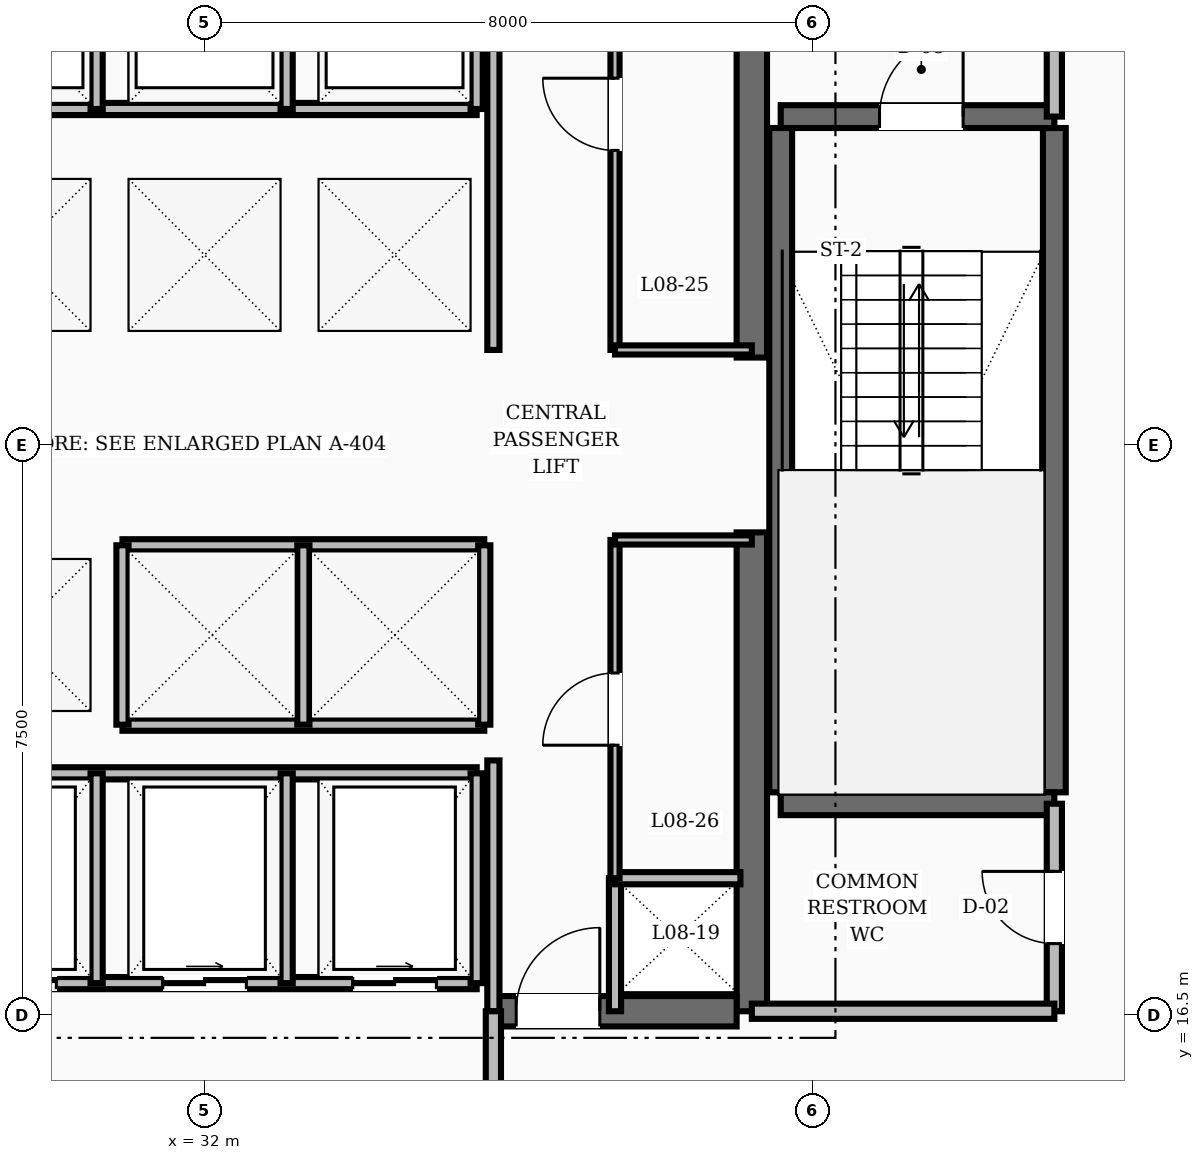
"""IFC4 building model, lengths in metres.
Left out: names, types, materials, properties, quantities, classifications, styles, units other than length and angle.
Written with IfcOpenShell. Run it as: python <this file> out.ifc"""

import sys

from ifc_helpers import new_model, si_unit, direction, frame, frame_2d, origin, place, context, subcontext, project, spatial, rectangle, extrude, element, fill, save


model = new_model("IFC4")
c1 = context("Model", 3, precision=1e-05, world=origin(), true_north=direction((0.0, 1.0)))
c2 = subcontext(c1, "Body", "Model", "MODEL_VIEW")
j1 = project(units=[si_unit("LENGTHUNIT", "METRE"), si_unit("PLANEANGLEUNIT", "RADIAN")], contexts=[c1])
p1 = place(None, origin())
s1 = spatial("IfcSite", under=j1, at=p1, CompositionType="ELEMENT")
p2 = place(p1, origin())
s2 = spatial("IfcBuilding", under=s1, at=p2, CompositionType="ELEMENT")
p3 = place(p2, frame((0.0, 0.0, 37.6)))
s3 = spatial("IfcBuildingStorey", under=s2, at=p3, CompositionType="ELEMENT", Elevation=37.6)
for number, where, z_axis, x_axis in (
    (1, (39.2, 16.55, 0.0), (0.0, 0.0, 1.0), (0.0, 1.0, 0.0)),
    (2, (39.2, 25.15, 0.0), (0.0, 0.0, 1.0), (0.0, 1.0, 0.0)),
):
    element("IfcWall", number, at=place(p3, frame(where, z_axis=z_axis, x_axis=x_axis)), inside=s3, PredefinedType="SHEAR", context=c2, shape_type="SweptSolid", body=[
        extrude(rectangle(XDim=6.3, YDim=0.4, at=frame_2d((3.15, 0.0))), origin(), (0.0, 0.0, 1.0), 3.6),
    ])
p4 = place(p3, frame((35.8, 16.55, 0.0), z_axis=(0.0, 0.0, 1.0), x_axis=(1.0, 0.0, 0.0)))
e3 = element("IfcWall", 3, at=p4, inside=s3, PredefinedType="SHEAR", context=c2, shape_type="SweptSolid", body=[
    extrude(rectangle(XDim=3.2, YDim=0.4, at=frame_2d((1.6, 0.0))), origin(), (0.0, 0.0, 1.0), 3.6),
])
p5 = place(p4, frame((0.3, 0.0, 0.0)))
e4 = element("IfcOpeningElement", 4, at=p5, cuts=e3, PredefinedType="OPENING", context=c2, shape_type="SweptSolid", body=[
    extrude(rectangle(XDim=1.1, YDim=2.1, at=frame_2d((0.55, 1.05))), frame((0.0, 0.21, 0.0), z_axis=(0.0, -1.0, 0.0), x_axis=(1.0, 0.0, 0.0)), (0.0, 0.0, 1.0), 0.42),
])
for number, where, z_axis, x_axis in (
    (5, (43.18, 19.43, 0.0), (0.0, 0.0, 1.0), (0.0, 1.0, 0.0)),
    (6, (39.58, 19.43, 0.0), (0.0, 0.0, 1.0), (0.0, 1.0, 0.0)),
):
    element("IfcWall", number, at=place(p3, frame(where, z_axis=z_axis, x_axis=x_axis)), inside=s3, PredefinedType="SHEAR", context=c2, shape_type="SweptSolid", body=[
        extrude(rectangle(XDim=8.74, YDim=0.3, at=frame_2d((4.37, 0.0))), origin(), (0.0, 0.0, 1.0), 3.6),
    ])
p6 = place(p3, frame((39.58, 19.28, 0.0), z_axis=(0.0, 0.0, 1.0), x_axis=(1.0, 0.0, 0.0)))
e7 = element("IfcWall", 7, at=p6, inside=s3, PredefinedType="SHEAR", context=c2, shape_type="SweptSolid", body=[
    extrude(rectangle(XDim=3.6, YDim=0.3, at=frame_2d((1.8, 0.0))), origin(), (0.0, 0.0, 1.0), 3.6),
])
p7 = place(p3, frame((39.58, 28.32, 0.0), z_axis=(0.0, 0.0, 1.0), x_axis=(1.0, 0.0, 0.0)))
e8 = element("IfcWall", 8, at=p7, inside=s3, PredefinedType="SHEAR", context=c2, shape_type="SweptSolid", body=[
    extrude(rectangle(XDim=3.6, YDim=0.3, at=frame_2d((1.8, 0.0))), origin(), (0.0, 0.0, 1.0), 3.6),
])
p8 = place(p7, frame((1.3, 0.0, 0.0)))
e9 = element("IfcOpeningElement", 9, at=p8, cuts=e8, PredefinedType="OPENING", context=c2, shape_type="SweptSolid", body=[
    extrude(rectangle(XDim=1.1, YDim=2.1, at=frame_2d((0.55, 1.05))), frame((0.0, 0.16, 0.0), z_axis=(0.0, -1.0, 0.0), x_axis=(1.0, 0.0, 0.0)), (0.0, 0.0, 1.0), 0.32),
])
p9 = place(p3, frame((43.18, 28.32, 0.0), z_axis=(0.0, 0.0, 1.0), x_axis=(0.0, 1.0, 0.0)))
e10 = element("IfcWall", 10, at=p9, inside=s3, PredefinedType="SOLIDWALL", context=c2, shape_type="SweptSolid", body=[
    extrude(rectangle(XDim=3.13, YDim=0.2, at=frame_2d((1.565, 0.0))), origin(), (0.0, 0.0, 1.0), 2.61),
])
p10 = place(p9, frame((1.015, 0.0, 0.0)))
e11 = element("IfcOpeningElement", 11, at=p10, cuts=e10, PredefinedType="OPENING", context=c2, shape_type="SweptSolid", body=[
    extrude(rectangle(XDim=1.1, YDim=2.1, at=frame_2d((0.55, 1.05))), frame((0.0, 0.11, 0.0), z_axis=(0.0, -1.0, 0.0), x_axis=(1.0, 0.0, 0.0)), (0.0, 0.0, 1.0), 0.22),
])
p11 = place(p3, frame((43.18, 16.55, 0.0), z_axis=(0.0, 0.0, 1.0), x_axis=(0.0, 1.0, 0.0)))
e12 = element("IfcWall", 12, at=p11, inside=s3, PredefinedType="SOLIDWALL", context=c2, shape_type="SweptSolid", body=[
    extrude(rectangle(XDim=2.73, YDim=0.2, at=frame_2d((1.365, 0.0))), origin(), (0.0, 0.0, 1.0), 2.61),
])
p12 = place(p11, frame((0.89, 0.0, 0.0)))
e13 = element("IfcOpeningElement", 13, at=p12, cuts=e12, PredefinedType="OPENING", context=c2, shape_type="SweptSolid", body=[
    extrude(rectangle(XDim=0.95, YDim=2.1, at=frame_2d((0.475, 1.05))), frame((0.0, 0.11, 0.0), z_axis=(0.0, -1.0, 0.0), x_axis=(1.0, 0.0, 0.0)), (0.0, 0.0, 1.0), 0.22),
])
p13 = place(p3, frame((39.2, 16.55, 0.0), z_axis=(0.0, 0.0, 1.0), x_axis=(1.0, 0.0, 0.0)))
e14 = element("IfcWall", 14, at=p13, inside=s3, PredefinedType="SOLIDWALL", context=c2, shape_type="SweptSolid", body=[
    extrude(rectangle(XDim=3.98, YDim=0.2, at=frame_2d((1.99, 0.0))), origin(), (0.0, 0.0, 1.0), 2.61),
])
p14 = place(p3, frame((35.8, 16.55, 0.0), z_axis=(0.0, 0.0, 1.0), x_axis=(0.0, 1.0, 0.0)))
e15 = element("IfcWall", 15, at=p14, inside=s3, PredefinedType="SOLIDWALL", context=c2, shape_type="SweptSolid", body=[
    extrude(rectangle(XDim=3.3, YDim=0.16, at=frame_2d((1.65, 0.0))), origin(), (0.0, 0.0, 1.0), 2.61),
])
p15 = place(p3, frame((37.4, 16.55, 0.0), z_axis=(0.0, 0.0, 1.0), x_axis=(0.0, 1.0, 0.0)))
e16 = element("IfcWall", 16, at=p15, inside=s3, PredefinedType="SOLIDWALL", context=c2, shape_type="SweptSolid", body=[
    extrude(rectangle(XDim=1.75, YDim=0.16, at=frame_2d((0.875, 0.0))), origin(), (0.0, 0.0, 1.0), 2.61),
])
p16 = place(p3, frame((35.8, 25.25, 0.0), z_axis=(0.0, 0.0, 1.0), x_axis=(0.0, 1.0, 0.0)))
e17 = element("IfcWall", 17, at=p16, inside=s3, PredefinedType="SOLIDWALL", context=c2, shape_type="SweptSolid", body=[
    extrude(rectangle(XDim=6.2, YDim=0.16, at=frame_2d((3.1, 0.0))), origin(), (0.0, 0.0, 1.0), 2.61),
])
p17 = place(p3, frame((35.8, 14.35, 0.0), z_axis=(0.0, 0.0, 1.0), x_axis=(0.0, 1.0, 0.0)))
e18 = element("IfcWall", 18, at=p17, inside=s3, PredefinedType="SOLIDWALL", context=c2, shape_type="SweptSolid", body=[
    extrude(rectangle(XDim=2.2, YDim=0.2, at=frame_2d((1.1, 0.0))), origin(), (0.0, 0.0, 1.0), 2.61),
])
p18 = place(p3, frame((28.42, 28.42, 0.0), z_axis=(0.0, 0.0, 1.0), x_axis=(1.0, 0.0, 0.0)))
e19 = element("IfcWall", 19, at=p18, inside=s3, PredefinedType="SOLIDWALL", context=c2, shape_type="SweptSolid", body=[
    extrude(rectangle(XDim=7.16, YDim=0.16, at=frame_2d((3.58, 0.0))), origin(), (0.0, 0.0, 1.0), 2.61),
])
for number, where, z_axis, x_axis in (
    (20, (30.58, 28.42, 0.0), (0.0, 0.0, 1.0), (0.0, 1.0, 0.0)),
    (21, (33.08, 28.42, 0.0), (0.0, 0.0, 1.0), (0.0, 1.0, 0.0)),
    (22, (35.58, 28.42, 0.0), (0.0, 0.0, 1.0), (0.0, 1.0, 0.0)),
):
    element("IfcWall", number, at=place(p3, frame(where, z_axis=z_axis, x_axis=x_axis)), inside=s3, PredefinedType="SOLIDWALL", context=c2, shape_type="SweptSolid", body=[
        extrude(rectangle(XDim=2.16, YDim=0.16, at=frame_2d((1.08, 0.0))), origin(), (0.0, 0.0, 1.0), 2.61),
    ])
for number, where, z_axis, x_axis in (
    (23, (30.92, 22.68, 0.0), (0.0, 0.0, 1.0), (1.0, 0.0, 0.0)),
    (24, (30.92, 20.32, 0.0), (0.0, 0.0, 1.0), (1.0, 0.0, 0.0)),
):
    element("IfcWall", number, at=place(p3, frame(where, z_axis=z_axis, x_axis=x_axis)), inside=s3, PredefinedType="SOLIDWALL", context=c2, shape_type="SweptSolid", body=[
        extrude(rectangle(XDim=4.76, YDim=0.16, at=frame_2d((2.38, 0.0))), origin(), (0.0, 0.0, 1.0), 2.61),
    ])
for number, where, z_axis, x_axis in (
    (25, (30.92, 20.32, 0.0), (0.0, 0.0, 1.0), (0.0, 1.0, 0.0)),
    (26, (33.3, 20.32, 0.0), (0.0, 0.0, 1.0), (0.0, 1.0, 0.0)),
    (27, (35.68, 20.32, 0.0), (0.0, 0.0, 1.0), (0.0, 1.0, 0.0)),
):
    element("IfcWall", number, at=place(p3, frame(where, z_axis=z_axis, x_axis=x_axis)), inside=s3, PredefinedType="SOLIDWALL", context=c2, shape_type="SweptSolid", body=[
        extrude(rectangle(XDim=2.36, YDim=0.16, at=frame_2d((1.18, 0.0))), origin(), (0.0, 0.0, 1.0), 2.61),
    ])
p19 = place(p3, frame((28.42, 16.92, 0.0), z_axis=(0.0, 0.0, 1.0), x_axis=(1.0, 0.0, 0.0)))
e28 = element("IfcWall", 28, at=p19, inside=s3, PredefinedType="SOLIDWALL", context=c2, shape_type="SweptSolid", body=[
    extrude(rectangle(XDim=7.16, YDim=0.16, at=frame_2d((3.58, 0.0))), origin(), (0.0, 0.0, 1.0), 2.61),
])
p20 = place(p19, frame((0.53, 0.0, 0.0)))
e29 = element("IfcOpeningElement", 29, at=p20, cuts=e28, PredefinedType="OPENING", context=c2, shape_type="SweptSolid", body=[
    extrude(rectangle(XDim=1.1, YDim=2.15, at=frame_2d((0.55, 1.075))), frame((0.0, 0.09, 0.0), z_axis=(0.0, -1.0, 0.0), x_axis=(1.0, 0.0, 0.0)), (0.0, 0.0, 1.0), 0.18),
])
p21 = place(p19, frame((3.03, 0.0, 0.0)))
e30 = element("IfcOpeningElement", 30, at=p21, cuts=e28, PredefinedType="OPENING", context=c2, shape_type="SweptSolid", body=[
    extrude(rectangle(XDim=1.1, YDim=2.15, at=frame_2d((0.55, 1.075))), frame((0.0, 0.09, 0.0), z_axis=(0.0, -1.0, 0.0), x_axis=(1.0, 0.0, 0.0)), (0.0, 0.0, 1.0), 0.18),
])
p22 = place(p19, frame((5.53, 0.0, 0.0)))
e31 = element("IfcOpeningElement", 31, at=p22, cuts=e28, PredefinedType="OPENING", context=c2, shape_type="SweptSolid", body=[
    extrude(rectangle(XDim=1.1, YDim=2.15, at=frame_2d((0.55, 1.075))), frame((0.0, 0.09, 0.0), z_axis=(0.0, -1.0, 0.0), x_axis=(1.0, 0.0, 0.0)), (0.0, 0.0, 1.0), 0.18),
])
p23 = place(p3, frame((28.42, 19.68, 0.0), z_axis=(0.0, 0.0, 1.0), x_axis=(1.0, 0.0, 0.0)))
e32 = element("IfcWall", 32, at=p23, inside=s3, PredefinedType="SOLIDWALL", context=c2, shape_type="SweptSolid", body=[
    extrude(rectangle(XDim=7.16, YDim=0.16, at=frame_2d((3.58, 0.0))), origin(), (0.0, 0.0, 1.0), 2.61),
])
for number, where, z_axis, x_axis in (
    (33, (30.58, 16.92, 0.0), (0.0, 0.0, 1.0), (0.0, 1.0, 0.0)),
    (34, (33.08, 16.92, 0.0), (0.0, 0.0, 1.0), (0.0, 1.0, 0.0)),
    (35, (35.58, 16.92, 0.0), (0.0, 0.0, 1.0), (0.0, 1.0, 0.0)),
):
    element("IfcWall", number, at=place(p3, frame(where, z_axis=z_axis, x_axis=x_axis)), inside=s3, PredefinedType="SOLIDWALL", context=c2, shape_type="SweptSolid", body=[
        extrude(rectangle(XDim=2.76, YDim=0.16, at=frame_2d((1.38, 0.0))), origin(), (0.0, 0.0, 1.0), 2.61),
    ])
p24 = place(p3, frame((37.4, 18.3, 0.0), z_axis=(0.0, 0.0, 1.0), x_axis=(1.0, 0.0, 0.0)))
e36 = element("IfcWall", 36, at=p24, inside=s3, PredefinedType="SOLIDWALL", context=c2, shape_type="SweptSolid", body=[
    extrude(rectangle(XDim=1.65, YDim=0.16, at=frame_2d((0.825, 0.0))), origin(), (0.0, 0.0, 1.0), 2.61),
])
p25 = place(p3, frame((37.4, 25.25, 0.0), z_axis=(0.0, 0.0, 1.0), x_axis=(0.0, 1.0, 0.0)))
e37 = element("IfcWall", 37, at=p25, inside=s3, PredefinedType="PARTITIONING", context=c2, shape_type="SweptSolid", body=[
    extrude(rectangle(XDim=6.2, YDim=0.12, at=frame_2d((3.1, 0.0))), origin(), (0.0, 0.0, 1.0), 2.61),
])
p26 = place(p25, frame((2.625, 0.0, 0.0)))
e38 = element("IfcOpeningElement", 38, at=p26, cuts=e37, PredefinedType="OPENING", context=c2, shape_type="SweptSolid", body=[
    extrude(rectangle(XDim=0.95, YDim=2.1, at=frame_2d((0.475, 1.05))), frame((0.0, 0.07, 0.0), z_axis=(0.0, -1.0, 0.0), x_axis=(1.0, 0.0, 0.0)), (0.0, 0.0, 1.0), 0.14),
])
p27 = place(p3, frame((37.4, 25.25, 0.0), z_axis=(0.0, 0.0, 1.0), x_axis=(1.0, 0.0, 0.0)))
e39 = element("IfcWall", 39, at=p27, inside=s3, PredefinedType="PARTITIONING", context=c2, shape_type="SweptSolid", body=[
    extrude(rectangle(XDim=1.8, YDim=0.12, at=frame_2d((0.9, 0.0))), origin(), (0.0, 0.0, 1.0), 2.61),
])
p28 = place(p3, frame((37.4, 18.3, 0.0), z_axis=(0.0, 0.0, 1.0), x_axis=(0.0, 1.0, 0.0)))
e40 = element("IfcWall", 40, at=p28, inside=s3, PredefinedType="PARTITIONING", context=c2, shape_type="SweptSolid", body=[
    extrude(rectangle(XDim=4.45, YDim=0.12, at=frame_2d((2.225, 0.0))), origin(), (0.0, 0.0, 1.0), 2.61),
])
p29 = place(p28, frame((1.75, 0.0, 0.0)))
e41 = element("IfcOpeningElement", 41, at=p29, cuts=e40, PredefinedType="OPENING", context=c2, shape_type="SweptSolid", body=[
    extrude(rectangle(XDim=0.95, YDim=2.1, at=frame_2d((0.475, 1.05))), frame((0.0, 0.07, 0.0), z_axis=(0.0, -1.0, 0.0), x_axis=(1.0, 0.0, 0.0)), (0.0, 0.0, 1.0), 0.14),
])
p30 = place(p3, frame((37.4, 22.75, 0.0), z_axis=(0.0, 0.0, 1.0), x_axis=(1.0, 0.0, 0.0)))
e42 = element("IfcWall", 42, at=p30, inside=s3, PredefinedType="PARTITIONING", context=c2, shape_type="SweptSolid", body=[
    extrude(rectangle(XDim=1.8, YDim=0.12, at=frame_2d((0.9, 0.0))), origin(), (0.0, 0.0, 1.0), 2.61),
])
p31 = place(p3, frame((43.349, 14.56, 0.0), z_axis=(0.0, 0.0, 1.0), x_axis=(0.702366174226, 0.711815816981, 0.0)))
e43 = element("IfcWall", 43, at=p31, inside=s3, PredefinedType="SOLIDWALL", context=c2, shape_type="SweptSolid", body=[
    extrude(rectangle(XDim=2.842, YDim=0.16, at=frame_2d((1.421, 0.0))), origin(), (0.0, 0.0, 1.0), 2.61),
])
p32 = place(p8, origin())
e44 = element("IfcDoor", 44, at=p32, inside=s3, OperationType="SINGLE_SWING_RIGHT", PredefinedType="DOOR", context=c2, shape_type="SweptSolid", body=[
    extrude(rectangle(XDim=1.1, YDim=2.1, at=frame_2d((0.55, 1.05))), frame((0.0, 0.025, 0.0), z_axis=(0.0, -1.0, 0.0), x_axis=(1.0, 0.0, 0.0)), (0.0, 0.0, 1.0), 0.05),
])
fill(e9, e44)
p33 = place(p12, origin())
e45 = element("IfcDoor", 45, at=p33, inside=s3, OperationType="SINGLE_SWING_RIGHT", PredefinedType="DOOR", context=c2, shape_type="SweptSolid", body=[
    extrude(rectangle(XDim=0.95, YDim=2.1, at=frame_2d((0.475, 1.05))), frame((0.0, 0.025, 0.0), z_axis=(0.0, -1.0, 0.0), x_axis=(1.0, 0.0, 0.0)), (0.0, 0.0, 1.0), 0.05),
])
fill(e13, e45)
p34 = place(p5, origin())
e46 = element("IfcDoor", 46, at=p34, inside=s3, OperationType="SINGLE_SWING_RIGHT", PredefinedType="DOOR", context=c2, shape_type="SweptSolid", body=[
    extrude(rectangle(XDim=1.1, YDim=2.1, at=frame_2d((0.55, 1.05))), frame((0.0, 0.025, 0.0), z_axis=(0.0, -1.0, 0.0), x_axis=(1.0, 0.0, 0.0)), (0.0, 0.0, 1.0), 0.05),
])
fill(e4, e46)
p35 = place(p20, origin())
e47 = element("IfcDoor", 47, at=p35, inside=s3, OperationType="SLIDING_TO_RIGHT", PredefinedType="DOOR", context=c2, shape_type="SweptSolid", body=[
    extrude(rectangle(XDim=1.1, YDim=2.15, at=frame_2d((0.55, 1.075))), frame((0.0, 0.025, 0.0), z_axis=(0.0, -1.0, 0.0), x_axis=(1.0, 0.0, 0.0)), (0.0, 0.0, 1.0), 0.05),
])
fill(e29, e47)
p36 = place(p21, origin())
e48 = element("IfcDoor", 48, at=p36, inside=s3, OperationType="SLIDING_TO_RIGHT", PredefinedType="DOOR", context=c2, shape_type="SweptSolid", body=[
    extrude(rectangle(XDim=1.1, YDim=2.15, at=frame_2d((0.55, 1.075))), frame((0.0, 0.025, 0.0), z_axis=(0.0, -1.0, 0.0), x_axis=(1.0, 0.0, 0.0)), (0.0, 0.0, 1.0), 0.05),
])
fill(e30, e48)
p37 = place(p22, origin())
e49 = element("IfcDoor", 49, at=p37, inside=s3, OperationType="SLIDING_TO_RIGHT", PredefinedType="DOOR", context=c2, shape_type="SweptSolid", body=[
    extrude(rectangle(XDim=1.1, YDim=2.15, at=frame_2d((0.55, 1.075))), frame((0.0, 0.025, 0.0), z_axis=(0.0, -1.0, 0.0), x_axis=(1.0, 0.0, 0.0)), (0.0, 0.0, 1.0), 0.05),
])
fill(e31, e49)
p38 = place(p26, origin())
e50 = element("IfcDoor", 50, at=p38, inside=s3, OperationType="SINGLE_SWING_RIGHT", PredefinedType="DOOR", context=c2, shape_type="SweptSolid", body=[
    extrude(rectangle(XDim=0.95, YDim=2.1, at=frame_2d((0.475, 1.05))), frame((0.0, 0.025, 0.0), z_axis=(0.0, -1.0, 0.0), x_axis=(1.0, 0.0, 0.0)), (0.0, 0.0, 1.0), 0.05),
])
fill(e38, e50)
p39 = place(p29, origin())
e51 = element("IfcDoor", 51, at=p39, inside=s3, OperationType="SINGLE_SWING_LEFT", PredefinedType="DOOR", context=c2, shape_type="SweptSolid", body=[
    extrude(rectangle(XDim=0.95, YDim=2.1, at=frame_2d((0.475, 1.05))), frame((0.0, 0.025, 0.0), z_axis=(0.0, -1.0, 0.0), x_axis=(1.0, 0.0, 0.0)), (0.0, 0.0, 1.0), 0.05),
])
fill(e41, e51)
save(model, sys.argv[1])
